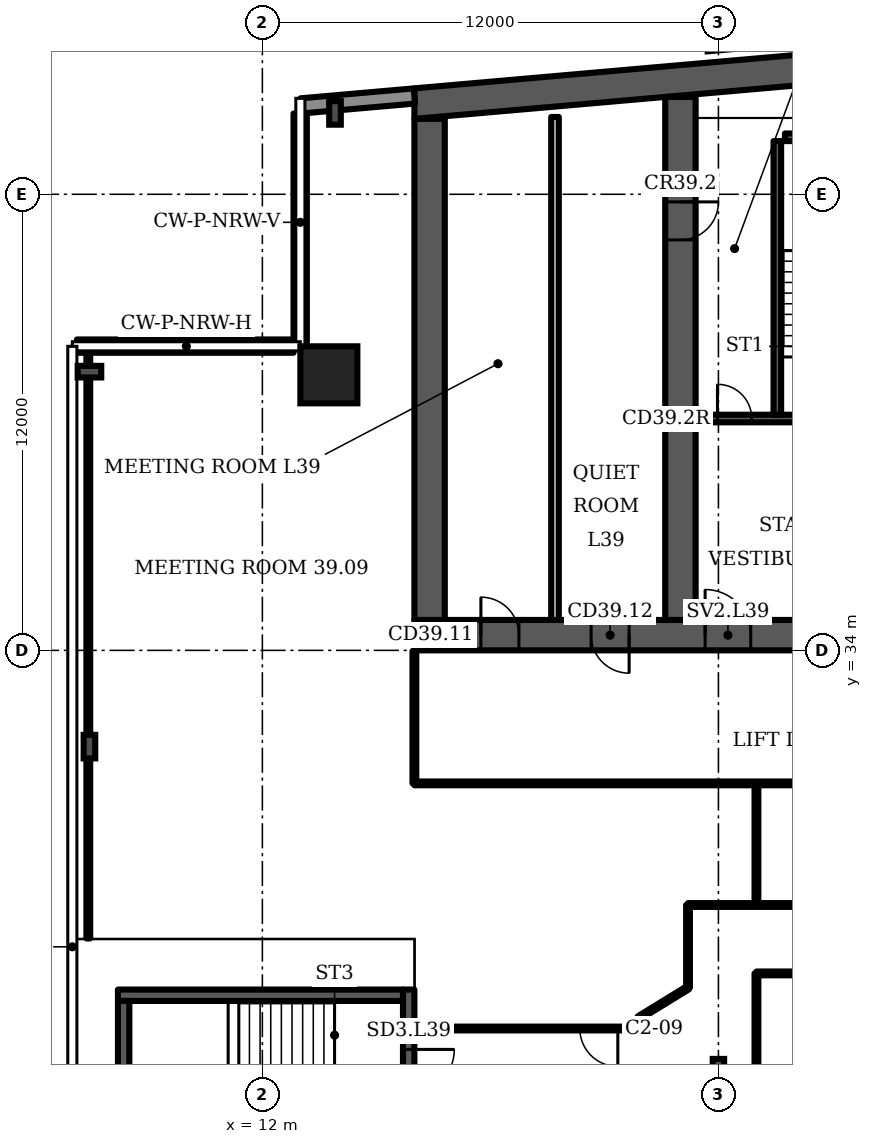
"""IFC4 building model, lengths in metres.
Left out: names, types, materials, properties, quantities, classifications, styles, units other than length and angle.
Written with IfcOpenShell. Run it as: python <this file> out.ifc"""

import sys

from ifc_helpers import new_model, si_unit, direction, frame, frame_2d, origin, origin_2d, place, context, subcontext, project, spatial, polyline, rectangle, i_section, outline, extrude, element, fill, save


model = new_model("IFC4")
c1 = context("Model", 3, precision=1e-05, world=origin(), true_north=direction((0.0, 1.0)))
c2 = subcontext(c1, "Body", "Model", "MODEL_VIEW")
j1 = project(units=[si_unit("LENGTHUNIT", "METRE"), si_unit("PLANEANGLEUNIT", "RADIAN")], contexts=[c1])
p1 = place(None, origin())
s1 = spatial("IfcSite", under=j1, at=p1, CompositionType="ELEMENT")
p2 = place(p1, origin())
s2 = spatial("IfcBuilding", under=s1, at=p2, CompositionType="ELEMENT")
p3 = place(p2, frame((0.0, 0.0, 162.7)))
s3 = spatial("IfcBuildingStorey", under=s2, at=p3, CompositionType="ELEMENT", Elevation=162.7)
p4 = place(p3, origin())
e1 = element("IfcWall", 1, at=p4, inside=s3, PredefinedType="SHEAR", context=c2, shape_type="SweptSolid", body=[
    extrude(outline(polyline([(16.0, 47.984), (37.0, 49.822), (58.0, 47.984), (58.0, 48.787), (37.0, 50.625), (16.0, 48.787), (16.0, 47.984)])), origin(), (0.0, 0.0, 1.0), 3.6),
])
p5 = place(p3, frame((16.0, 34.4, 0.0), z_axis=(0.0, 0.0, 1.0), x_axis=(1.0, 0.0, 0.0)))
e2 = element("IfcWall", 2, at=p5, inside=s3, PredefinedType="SHEAR", context=c2, shape_type="SweptSolid", body=[
    extrude(rectangle(XDim=42.0, YDim=0.8, at=frame_2d((21.0, 0.0))), origin(), (0.0, 0.0, 1.0), 3.6),
])
p6 = place(p5, frame((1.75, 0.0, 0.0)))
e3 = element("IfcOpeningElement", 3, at=p6, cuts=e2, PredefinedType="OPENING", context=c2, shape_type="SweptSolid", body=[
    extrude(rectangle(XDim=1.0, YDim=2.1, at=frame_2d((0.5, 1.05))), frame((0.0, 0.41, 0.0), z_axis=(0.0, -1.0, 0.0), x_axis=(1.0, 0.0, 0.0)), (0.0, 0.0, 1.0), 0.82),
])
p7 = place(p5, frame((4.65, 0.0, 0.0)))
e4 = element("IfcOpeningElement", 4, at=p7, cuts=e2, PredefinedType="OPENING", context=c2, shape_type="SweptSolid", body=[
    extrude(rectangle(XDim=1.0, YDim=2.1, at=frame_2d((0.5, 1.05))), frame((0.0, 0.41, 0.0), z_axis=(0.0, -1.0, 0.0), x_axis=(1.0, 0.0, 0.0)), (0.0, 0.0, 1.0), 0.82),
])
p8 = place(p5, frame((7.65, 0.0, 0.0)))
e5 = element("IfcOpeningElement", 5, at=p8, cuts=e2, PredefinedType="OPENING", context=c2, shape_type="SweptSolid", body=[
    extrude(rectangle(XDim=1.2, YDim=2.1, at=frame_2d((0.6, 1.05))), frame((0.0, 0.41, 0.0), z_axis=(0.0, -1.0, 0.0), x_axis=(1.0, 0.0, 0.0)), (0.0, 0.0, 1.0), 0.82),
])
p9 = place(p5, frame((14.767, 0.0, 0.0)))
e6 = element("IfcOpeningElement", 6, at=p9, cuts=e2, PredefinedType="OPENING", context=c2, shape_type="SweptSolid", body=[
    extrude(rectangle(XDim=1.1, YDim=2.1, at=frame_2d((0.55, 1.05))), frame((0.0, 0.41, 0.0), z_axis=(0.0, -1.0, 0.0), x_axis=(1.0, 0.0, 0.0)), (0.0, 0.0, 1.0), 0.82),
])
p10 = place(p5, frame((19.133, 0.0, 0.0)))
e7 = element("IfcOpeningElement", 7, at=p10, cuts=e2, PredefinedType="OPENING", context=c2, shape_type="SweptSolid", body=[
    extrude(rectangle(XDim=1.1, YDim=2.1, at=frame_2d((0.55, 1.05))), frame((0.0, 0.41, 0.0), z_axis=(0.0, -1.0, 0.0), x_axis=(1.0, 0.0, 0.0)), (0.0, 0.0, 1.0), 0.82),
])
p11 = place(p5, frame((16.8, 0.0, 0.0)))
e8 = element("IfcOpeningElement", 8, at=p11, cuts=e2, PredefinedType="OPENING", context=c2, shape_type="SweptSolid", body=[
    extrude(rectangle(XDim=1.4, YDim=2.1, at=frame_2d((0.7, 1.05))), frame((0.0, 0.41, 0.0), z_axis=(0.0, -1.0, 0.0), x_axis=(1.0, 0.0, 0.0)), (0.0, 0.0, 1.0), 0.82),
])
p12 = place(p5, frame((21.767, 0.0, 0.0)))
e9 = element("IfcOpeningElement", 9, at=p12, cuts=e2, PredefinedType="OPENING", context=c2, shape_type="SweptSolid", body=[
    extrude(rectangle(XDim=1.1, YDim=2.1, at=frame_2d((0.55, 1.05))), frame((0.0, 0.41, 0.0), z_axis=(0.0, -1.0, 0.0), x_axis=(1.0, 0.0, 0.0)), (0.0, 0.0, 1.0), 0.82),
])
p13 = place(p5, frame((23.95, 0.0, 0.0)))
e10 = element("IfcOpeningElement", 10, at=p13, cuts=e2, PredefinedType="OPENING", context=c2, shape_type="SweptSolid", body=[
    extrude(rectangle(XDim=1.1, YDim=2.1, at=frame_2d((0.55, 1.05))), frame((0.0, 0.41, 0.0), z_axis=(0.0, -1.0, 0.0), x_axis=(1.0, 0.0, 0.0)), (0.0, 0.0, 1.0), 0.82),
])
p14 = place(p5, frame((26.133, 0.0, 0.0)))
e11 = element("IfcOpeningElement", 11, at=p14, cuts=e2, PredefinedType="OPENING", context=c2, shape_type="SweptSolid", body=[
    extrude(rectangle(XDim=1.1, YDim=2.1, at=frame_2d((0.55, 1.05))), frame((0.0, 0.41, 0.0), z_axis=(0.0, -1.0, 0.0), x_axis=(1.0, 0.0, 0.0)), (0.0, 0.0, 1.0), 0.82),
])
p15 = place(p5, frame((33.15, 0.0, 0.0)))
e12 = element("IfcOpeningElement", 12, at=p15, cuts=e2, PredefinedType="OPENING", context=c2, shape_type="SweptSolid", body=[
    extrude(rectangle(XDim=1.2, YDim=2.1, at=frame_2d((0.6, 1.05))), frame((0.0, 0.41, 0.0), z_axis=(0.0, -1.0, 0.0), x_axis=(1.0, 0.0, 0.0)), (0.0, 0.0, 1.0), 0.82),
])
p16 = place(p5, frame((35.817, 0.0, 0.0)))
e13 = element("IfcOpeningElement", 13, at=p16, cuts=e2, PredefinedType="OPENING", context=c2, shape_type="SweptSolid", body=[
    extrude(rectangle(XDim=1.0, YDim=2.1, at=frame_2d((0.5, 1.05))), frame((0.0, 0.41, 0.0), z_axis=(0.0, -1.0, 0.0), x_axis=(1.0, 0.0, 0.0)), (0.0, 0.0, 1.0), 0.82),
])
p17 = place(p5, frame((39.95, 0.0, 0.0)))
e14 = element("IfcOpeningElement", 14, at=p17, cuts=e2, PredefinedType="OPENING", context=c2, shape_type="SweptSolid", body=[
    extrude(rectangle(XDim=1.0, YDim=2.1, at=frame_2d((0.5, 1.05))), frame((0.0, 0.41, 0.0), z_axis=(0.0, -1.0, 0.0), x_axis=(1.0, 0.0, 0.0)), (0.0, 0.0, 1.0), 0.82),
])
p18 = place(p5, frame((37.767, 0.0, 0.0)))
e15 = element("IfcOpeningElement", 15, at=p18, cuts=e2, PredefinedType="OPENING", context=c2, shape_type="SweptSolid", body=[
    extrude(rectangle(XDim=1.4, YDim=2.1, at=frame_2d((0.7, 1.05))), frame((0.0, 0.41, 0.0), z_axis=(0.0, -1.0, 0.0), x_axis=(1.0, 0.0, 0.0)), (0.0, 0.0, 1.0), 0.82),
])
p19 = place(p3, frame((16.4, 34.8, 0.0), z_axis=(0.0, 0.0, 1.0), x_axis=(0.0, 1.0, 0.0)))
e16 = element("IfcWall", 16, at=p19, inside=s3, PredefinedType="SHEAR", context=c2, shape_type="SweptSolid", body=[
    extrude(rectangle(XDim=13.184, YDim=0.8, at=frame_2d((6.592, 0.0))), origin(), (0.0, 0.0, 1.0), 3.6),
])
p20 = place(p3, frame((23.0, 34.8, 0.0), z_axis=(0.0, 0.0, 1.0), x_axis=(0.0, 1.0, 0.0)))
e17 = element("IfcWall", 17, at=p20, inside=s3, PredefinedType="SHEAR", context=c2, shape_type="SweptSolid", body=[
    extrude(rectangle(XDim=13.762, YDim=0.8, at=frame_2d((6.881, 0.0))), origin(), (0.0, 0.0, 1.0), 3.6),
])
p21 = place(p20, frame((10.0, 0.0, 0.0)))
e18 = element("IfcOpeningElement", 18, at=p21, cuts=e17, PredefinedType="OPENING", context=c2, shape_type="SweptSolid", body=[
    extrude(rectangle(XDim=1.0, YDim=2.1, at=frame_2d((0.5, 1.05))), frame((0.0, 0.41, 0.0), z_axis=(0.0, -1.0, 0.0), x_axis=(1.0, 0.0, 0.0)), (0.0, 0.0, 1.0), 0.82),
])
p22 = place(p3, frame((13.75, 41.25, 0.0), z_axis=(0.0, 0.0, 1.0), x_axis=(1.0, 0.0, 0.0)))
e19 = element("IfcColumn", 19, at=p22, inside=s3, PredefinedType="COLUMN", context=c2, shape_type="SweptSolid", body=[
    extrude(rectangle(XDim=1.5, YDim=1.5, at=origin_2d()), origin(), (0.0, 0.0, 1.0), 3.6),
])
for number, where, z_axis, x_axis in (
    (20, (13.911, 48.141, 0.0), (0.0, 0.0, 1.0), (-1.0, 0.0, 0.0)),
    (21, (7.45, 41.333, 0.0), (0.0, 0.0, 1.0), (0.0, 1.0, 0.0)),
    (22, (7.45, 31.467, 0.0), (0.0, 0.0, 1.0), (-1.0, 0.0, 0.0)),
):
    element("IfcColumn", number, at=place(p3, frame(where, z_axis=z_axis, x_axis=x_axis)), inside=s3, PredefinedType="COLUMN", context=c2, shape_type="SweptSolid", body=[
        extrude(i_section(OverallWidth=0.305, OverallDepth=0.62, WebThickness=0.021, FlangeThickness=0.04, FilletRadius=0.027, at=origin_2d()), origin(), (0.0, 0.0, 1.0), 3.6),
    ])
p23 = place(p3, frame((24.0, 23.0, 0.0), z_axis=(0.0, 0.0, 1.0), x_axis=(1.0, 0.0, 0.0)))
e23 = element("IfcColumn", 23, at=p23, inside=s3, PredefinedType="COLUMN", context=c2, shape_type="SweptSolid", body=[
    extrude(i_section(OverallWidth=0.3, OverallDepth=0.5, WebThickness=0.014, FlangeThickness=0.028, FilletRadius=0.027, at=origin_2d()), origin(), (0.0, 0.0, 1.0), 3.6),
])
p24 = place(p3, frame((16.0, 48.587, 0.0), z_axis=(0.0, 0.0, 1.0), x_axis=(-0.996194, -0.087168, 0.0)))
e24 = element("IfcWall", 24, at=p24, inside=s3, PredefinedType="SOLIDWALL", context=c2, shape_type="SweptSolid", body=[
    extrude(rectangle(XDim=2.994, YDim=0.4, at=frame_2d((1.497, 0.0))), origin(), (0.0, 0.0, 1.0), 3.2),
])
p25 = place(p3, frame((12.995, 48.126, 0.0), z_axis=(0.0, 0.0, 1.0), x_axis=(0.0, -1.0, 0.0)))
e25 = element("IfcWall", 25, at=p25, inside=s3, PredefinedType="SOLIDWALL", context=c2, shape_type="SweptSolid", body=[
    extrude(rectangle(XDim=6.126, YDim=0.35, at=frame_2d((3.063, 0.0))), origin(), (0.0, 0.0, 1.0), 1.0),
])
p26 = place(p3, frame((12.82, 42.005, 0.0), z_axis=(0.0, 0.0, 1.0), x_axis=(-1.0, 0.0, 0.0)))
e26 = element("IfcWall", 26, at=p26, inside=s3, PredefinedType="SOLIDWALL", context=c2, shape_type="SweptSolid", body=[
    extrude(rectangle(XDim=5.7, YDim=0.35, at=frame_2d((2.85, 0.0))), origin(), (0.0, 0.0, 1.0), 1.0),
])
p27 = place(p3, frame((19.7, 34.8, 0.0), z_axis=(0.0, 0.0, 1.0), x_axis=(0.0, 1.0, 0.0)))
e27 = element("IfcWall", 27, at=p27, inside=s3, PredefinedType="PARTITIONING", context=c2, shape_type="SweptSolid", body=[
    extrude(rectangle(XDim=13.234, YDim=0.2, at=frame_2d((6.617, 0.0))), origin(), (0.0, 0.0, 1.0), 3.2),
])
p28 = place(p3, frame((23.4, 40.1, 0.0), z_axis=(0.0, 0.0, 1.0), x_axis=(1.0, 0.0, 0.0)))
e28 = element("IfcWall", 28, at=p28, inside=s3, PredefinedType="SHEAR", context=c2, shape_type="SweptSolid", body=[
    extrude(rectangle(XDim=6.2, YDim=0.2, at=frame_2d((3.1, 0.0))), origin(), (0.0, 0.0, 1.0), 3.2),
])
p29 = place(p28, frame((3.525, 0.0, 0.0)))
e29 = element("IfcOpeningElement", 29, at=p29, cuts=e28, PredefinedType="OPENING", context=c2, shape_type="SweptSolid", body=[
    extrude(rectangle(XDim=1.2, YDim=2.1, at=frame_2d((0.6, 1.05))), frame((0.0, 0.11, 0.0), z_axis=(0.0, -1.0, 0.0), x_axis=(1.0, 0.0, 0.0)), (0.0, 0.0, 1.0), 0.22),
])
p30 = place(p28, frame((0.575, 0.0, 0.0)))
e30 = element("IfcOpeningElement", 30, at=p30, cuts=e28, PredefinedType="OPENING", context=c2, shape_type="SweptSolid", body=[
    extrude(rectangle(XDim=0.9, YDim=2.1, at=frame_2d((0.45, 1.05))), frame((0.0, 0.11, 0.0), z_axis=(0.0, -1.0, 0.0), x_axis=(1.0, 0.0, 0.0)), (0.0, 0.0, 1.0), 0.22),
])
p31 = place(p3, frame((25.55, 40.2, 0.0), z_axis=(0.0, 0.0, 1.0), x_axis=(0.0, 1.0, 0.0)))
e31 = element("IfcWall", 31, at=p31, inside=s3, PredefinedType="SHEAR", context=c2, shape_type="SweptSolid", body=[
    extrude(rectangle(XDim=7.2, YDim=0.2, at=frame_2d((3.6, 0.0))), origin(), (0.0, 0.0, 1.0), 3.2),
])
p32 = place(p3, frame((25.75, 47.5, 0.0), z_axis=(0.0, 0.0, 1.0), x_axis=(1.0, 0.0, 0.0)))
e32 = element("IfcWall", 32, at=p32, inside=s3, PredefinedType="SHEAR", context=c2, shape_type="SweptSolid", body=[
    extrude(rectangle(XDim=3.85, YDim=0.2, at=frame_2d((1.925, 0.0))), origin(), (0.0, 0.0, 1.0), 3.2),
])
p33 = place(p3, frame((15.85, 20.725, 0.0), z_axis=(0.0, 0.0, 1.0), x_axis=(0.0, 1.0, 0.0)))
e33 = element("IfcWall", 33, at=p33, inside=s3, PredefinedType="SHEAR", context=c2, shape_type="SweptSolid", body=[
    extrude(rectangle(XDim=4.35, YDim=0.3, at=frame_2d((2.175, 0.0))), origin(), (0.0, 0.0, 1.0), 3.2),
])
p34 = place(p33, frame((1.575, 0.0, 0.0)))
e34 = element("IfcOpeningElement", 34, at=p34, cuts=e33, PredefinedType="OPENING", context=c2, shape_type="SweptSolid", body=[
    extrude(rectangle(XDim=1.2, YDim=2.1, at=frame_2d((0.6, 1.05))), frame((0.0, 0.16, 0.0), z_axis=(0.0, -1.0, 0.0), x_axis=(1.0, 0.0, 0.0)), (0.0, 0.0, 1.0), 0.32),
])
p35 = place(p3, frame((7.42, 26.42, 0.0), z_axis=(0.0, 0.0, 1.0), x_axis=(0.0, 1.0, 0.0)))
e35 = element("IfcWall", 35, at=p35, inside=s3, PredefinedType="PARTITIONING", context=c2, shape_type="SweptSolid", body=[
    extrude(rectangle(XDim=15.56, YDim=0.1, at=frame_2d((7.78, 0.0))), origin(), (0.0, 0.0, 1.0), 2.58),
])
p36 = place(p3, frame((16.0, 30.5, 0.0), z_axis=(0.0, 0.0, 1.0), x_axis=(0.0, 1.0, 0.0)))
e36 = element("IfcWall", 36, at=p36, inside=s3, PredefinedType="PARTITIONING", context=c2, shape_type="SweptSolid", body=[
    extrude(rectangle(XDim=3.48, YDim=0.1, at=frame_2d((1.74, 0.0))), origin(), (0.0, 0.0, 1.0), 3.2),
])
p37 = place(p3, frame((16.0, 30.5, 0.0), z_axis=(0.0, 0.0, 1.0), x_axis=(1.0, 0.0, 0.0)))
e37 = element("IfcWall", 37, at=p37, inside=s3, PredefinedType="PARTITIONING", context=c2, shape_type="SweptSolid", body=[
    extrude(rectangle(XDim=20.85, YDim=0.1, at=frame_2d((10.425, 0.0))), origin(), (0.0, 0.0, 1.0), 3.2),
])
p38 = place(p37, frame((14.42, 0.0, 0.0)))
e38 = element("IfcOpeningElement", 38, at=p38, cuts=e37, PredefinedType="OPENING", context=c2, shape_type="SweptSolid", body=[
    extrude(rectangle(XDim=1.0, YDim=2.1, at=frame_2d((0.5, 1.05))), frame((0.0, 0.06, 0.0), z_axis=(0.0, -1.0, 0.0), x_axis=(1.0, 0.0, 0.0)), (0.0, 0.0, 1.0), 0.12),
])
p39 = place(p3, frame((16.02, 24.05, 0.0), z_axis=(0.0, 0.0, 1.0), x_axis=(1.0, 0.0, 0.0)))
e39 = element("IfcWall", 39, at=p39, inside=s3, PredefinedType="PARTITIONING", context=c2, shape_type="SweptSolid", body=[
    extrude(rectangle(XDim=5.855, YDim=0.1, at=frame_2d((2.927, 0.0))), origin(), (0.0, 0.0, 1.0), 3.2),
])
p40 = place(p39, frame((4.333, 0.0, 0.0)))
e40 = element("IfcOpeningElement", 40, at=p40, cuts=e39, PredefinedType="OPENING", context=c2, shape_type="SweptSolid", body=[
    extrude(rectangle(XDim=1.0, YDim=2.1, at=frame_2d((0.5, 1.05))), frame((0.0, 0.06, 0.0), z_axis=(0.0, -1.0, 0.0), x_axis=(1.0, 0.0, 0.0)), (0.0, 0.0, 1.0), 0.12),
])
p41 = place(p3, frame((21.9, 24.325, 0.0), z_axis=(0.0, 0.0, 1.0), x_axis=(0.851649, 0.524104, 0.0)))
e41 = element("IfcWall", 41, at=p41, inside=s3, PredefinedType="PARTITIONING", context=c2, shape_type="SweptSolid", body=[
    extrude(rectangle(XDim=1.527, YDim=0.1, at=frame_2d((0.763, 0.0))), origin(), (0.0, 0.0, 1.0), 3.2),
])
p42 = place(p3, frame((23.2, 25.125, 0.0), z_axis=(0.0, 0.0, 1.0), x_axis=(0.0, 1.0, 0.0)))
e42 = element("IfcWall", 42, at=p42, inside=s3, PredefinedType="PARTITIONING", context=c2, shape_type="SweptSolid", body=[
    extrude(rectangle(XDim=2.175, YDim=0.1, at=frame_2d((1.087, 0.0))), origin(), (0.0, 0.0, 1.0), 3.2),
])
p43 = place(p3, frame((23.2, 27.3, 0.0), z_axis=(0.0, 0.0, 1.0), x_axis=(1.0, 0.0, 0.0)))
e43 = element("IfcWall", 43, at=p43, inside=s3, PredefinedType="PARTITIONING", context=c2, shape_type="SweptSolid", body=[
    extrude(rectangle(XDim=33.9, YDim=0.1, at=frame_2d((16.95, 0.0))), origin(), (0.0, 0.0, 1.0), 3.2),
])
p44 = place(p43, frame((16.3, 0.0, 0.0)))
e44 = element("IfcOpeningElement", 44, at=p44, cuts=e43, PredefinedType="OPENING", context=c2, shape_type="SweptSolid", body=[
    extrude(rectangle(XDim=1.0, YDim=2.1, at=frame_2d((0.5, 1.05))), frame((0.0, 0.06, 0.0), z_axis=(0.0, -1.0, 0.0), x_axis=(1.0, 0.0, 0.0)), (0.0, 0.0, 1.0), 0.12),
])
p45 = place(p43, frame((20.72, 0.0, 0.0)))
e45 = element("IfcOpeningElement", 45, at=p45, cuts=e43, PredefinedType="OPENING", context=c2, shape_type="SweptSolid", body=[
    extrude(rectangle(XDim=1.0, YDim=2.1, at=frame_2d((0.5, 1.05))), frame((0.0, 0.06, 0.0), z_axis=(0.0, -1.0, 0.0), x_axis=(1.0, 0.0, 0.0)), (0.0, 0.0, 1.0), 0.12),
])
p46 = place(p43, frame((23.54, 0.0, 0.0)))
e46 = element("IfcOpeningElement", 46, at=p46, cuts=e43, PredefinedType="OPENING", context=c2, shape_type="SweptSolid", body=[
    extrude(rectangle(XDim=1.0, YDim=2.1, at=frame_2d((0.5, 1.05))), frame((0.0, 0.06, 0.0), z_axis=(0.0, -1.0, 0.0), x_axis=(1.0, 0.0, 0.0)), (0.0, 0.0, 1.0), 0.12),
])
p47 = place(p43, frame((26.36, 0.0, 0.0)))
e47 = element("IfcOpeningElement", 47, at=p47, cuts=e43, PredefinedType="OPENING", context=c2, shape_type="SweptSolid", body=[
    extrude(rectangle(XDim=1.0, YDim=2.1, at=frame_2d((0.5, 1.05))), frame((0.0, 0.06, 0.0), z_axis=(0.0, -1.0, 0.0), x_axis=(1.0, 0.0, 0.0)), (0.0, 0.0, 1.0), 0.12),
])
p48 = place(p43, frame((29.18, 0.0, 0.0)))
e48 = element("IfcOpeningElement", 48, at=p48, cuts=e43, PredefinedType="OPENING", context=c2, shape_type="SweptSolid", body=[
    extrude(rectangle(XDim=1.0, YDim=2.1, at=frame_2d((0.5, 1.05))), frame((0.0, 0.06, 0.0), z_axis=(0.0, -1.0, 0.0), x_axis=(1.0, 0.0, 0.0)), (0.0, 0.0, 1.0), 0.12),
])
p49 = place(p43, frame((32.0, 0.0, 0.0)))
e49 = element("IfcOpeningElement", 49, at=p49, cuts=e43, PredefinedType="OPENING", context=c2, shape_type="SweptSolid", body=[
    extrude(rectangle(XDim=1.0, YDim=2.1, at=frame_2d((0.5, 1.05))), frame((0.0, 0.06, 0.0), z_axis=(0.0, -1.0, 0.0), x_axis=(1.0, 0.0, 0.0)), (0.0, 0.0, 1.0), 0.12),
])
p50 = place(p3, frame((25.0, 27.3, 0.0), z_axis=(0.0, 0.0, 1.0), x_axis=(0.0, 1.0, 0.0)))
e50 = element("IfcWall", 50, at=p50, inside=s3, PredefinedType="PARTITIONING", context=c2, shape_type="SweptSolid", body=[
    extrude(rectangle(XDim=3.2, YDim=0.1, at=frame_2d((1.6, 0.0))), origin(), (0.0, 0.0, 1.0), 3.2),
])
p51 = place(p3, frame((25.0, 13.675, 0.0), z_axis=(0.0, 0.0, 1.0), x_axis=(0.0, 1.0, 0.0)))
e51 = element("IfcWall", 51, at=p51, inside=s3, PredefinedType="PARTITIONING", context=c2, shape_type="SweptSolid", body=[
    extrude(rectangle(XDim=11.825, YDim=0.1, at=frame_2d((5.913, 0.0))), origin(), (0.0, 0.0, 1.0), 3.2),
])
p52 = place(p3, frame((25.0, 25.5, 0.0), z_axis=(0.0, 0.0, 1.0), x_axis=(1.0, 0.0, 0.0)))
e52 = element("IfcWall", 52, at=p52, inside=s3, PredefinedType="PARTITIONING", context=c2, shape_type="SweptSolid", body=[
    extrude(rectangle(XDim=36.705, YDim=0.1, at=frame_2d((18.353, 0.0))), origin(), (0.0, 0.0, 1.0), 3.2),
])
p53 = place(p52, frame((5.02, 0.0, 0.0)))
e53 = element("IfcOpeningElement", 53, at=p53, cuts=e52, PredefinedType="OPENING", context=c2, shape_type="SweptSolid", body=[
    extrude(rectangle(XDim=1.8, YDim=2.1, at=frame_2d((0.9, 1.05))), frame((0.0, 0.06, 0.0), z_axis=(0.0, -1.0, 0.0), x_axis=(1.0, 0.0, 0.0)), (0.0, 0.0, 1.0), 0.12),
])
p54 = place(p3, frame((8.2, 24.925, 0.0), z_axis=(0.0, 0.0, 1.0), x_axis=(1.0, 0.0, 0.0)))
e54 = element("IfcWall", 54, at=p54, inside=s3, PredefinedType="SHEAR", context=c2, shape_type="SweptSolid", body=[
    extrude(rectangle(XDim=7.5, YDim=0.3, at=frame_2d((3.75, 0.0))), origin(), (0.0, 0.0, 1.0), 3.2),
])
p55 = place(p3, frame((8.35, 21.025, 0.0), z_axis=(0.0, 0.0, 1.0), x_axis=(0.0, 1.0, 0.0)))
e55 = element("IfcWall", 55, at=p55, inside=s3, PredefinedType="SHEAR", context=c2, shape_type="SweptSolid", body=[
    extrude(rectangle(XDim=3.75, YDim=0.3, at=frame_2d((1.875, 0.0))), origin(), (0.0, 0.0, 1.0), 3.2),
])
p56 = place(p6, origin())
e56 = element("IfcDoor", 56, at=p56, inside=s3, OperationType="SINGLE_SWING_LEFT", PredefinedType="DOOR", context=c2, shape_type="SweptSolid", body=[
    extrude(rectangle(XDim=1.0, YDim=2.1, at=frame_2d((0.5, 1.05))), frame((0.0, 0.4, 0.0), z_axis=(0.0, -1.0, 0.0), x_axis=(1.0, 0.0, 0.0)), (0.0, 0.0, 1.0), 0.8),
])
fill(e3, e56)
p57 = place(p7, origin())
e57 = element("IfcDoor", 57, at=p57, inside=s3, OperationType="SINGLE_SWING_RIGHT", PredefinedType="DOOR", context=c2, shape_type="SweptSolid", body=[
    extrude(rectangle(XDim=1.0, YDim=2.1, at=frame_2d((0.5, 1.05))), frame((0.0, 0.4, 0.0), z_axis=(0.0, -1.0, 0.0), x_axis=(1.0, 0.0, 0.0)), (0.0, 0.0, 1.0), 0.8),
])
fill(e4, e57)
p58 = place(p30, origin())
e58 = element("IfcDoor", 58, at=p58, inside=s3, OperationType="SINGLE_SWING_LEFT", PredefinedType="DOOR", context=c2, shape_type="SweptSolid", body=[
    extrude(rectangle(XDim=0.9, YDim=2.1, at=frame_2d((0.45, 1.05))), frame((0.0, 0.025, 0.0), z_axis=(0.0, -1.0, 0.0), x_axis=(1.0, 0.0, 0.0)), (0.0, 0.0, 1.0), 0.05),
])
fill(e30, e58)
p59 = place(p8, origin())
e59 = element("IfcDoor", 59, at=p59, inside=s3, OperationType="SINGLE_SWING_LEFT", PredefinedType="DOOR", context=c2, shape_type="SweptSolid", body=[
    extrude(rectangle(XDim=1.2, YDim=2.1, at=frame_2d((0.6, 1.05))), frame((0.0, 0.025, 0.0), z_axis=(0.0, -1.0, 0.0), x_axis=(1.0, 0.0, 0.0)), (0.0, 0.0, 1.0), 0.05),
])
fill(e5, e59)
p60 = place(p21, origin())
e60 = element("IfcDoor", 60, at=p60, inside=s3, OperationType="SINGLE_SWING_RIGHT", PredefinedType="DOOR", context=c2, shape_type="SweptSolid", body=[
    extrude(rectangle(XDim=1.0, YDim=2.1, at=frame_2d((0.5, 1.05))), frame((0.0, 0.4, 0.0), z_axis=(0.0, -1.0, 0.0), x_axis=(1.0, 0.0, 0.0)), (0.0, 0.0, 1.0), 0.8),
])
fill(e18, e60)
p61 = place(p34, origin())
e61 = element("IfcDoor", 61, at=p61, inside=s3, OperationType="SINGLE_SWING_RIGHT", PredefinedType="DOOR", context=c2, shape_type="SweptSolid", body=[
    extrude(rectangle(XDim=1.2, YDim=2.1, at=frame_2d((0.6, 1.05))), frame((0.0, 0.025, 0.0), z_axis=(0.0, -1.0, 0.0), x_axis=(1.0, 0.0, 0.0)), (0.0, 0.0, 1.0), 0.05),
])
fill(e34, e61)
p62 = place(p40, origin())
e62 = element("IfcDoor", 62, at=p62, inside=s3, OperationType="SINGLE_SWING_RIGHT", PredefinedType="DOOR", context=c2, shape_type="SweptSolid", body=[
    extrude(rectangle(XDim=1.0, YDim=2.1, at=frame_2d((0.5, 1.05))), frame((0.0, 0.025, 0.0), z_axis=(0.0, -1.0, 0.0), x_axis=(1.0, 0.0, 0.0)), (0.0, 0.0, 1.0), 0.05),
])
fill(e40, e62)
save(model, sys.argv[1])
